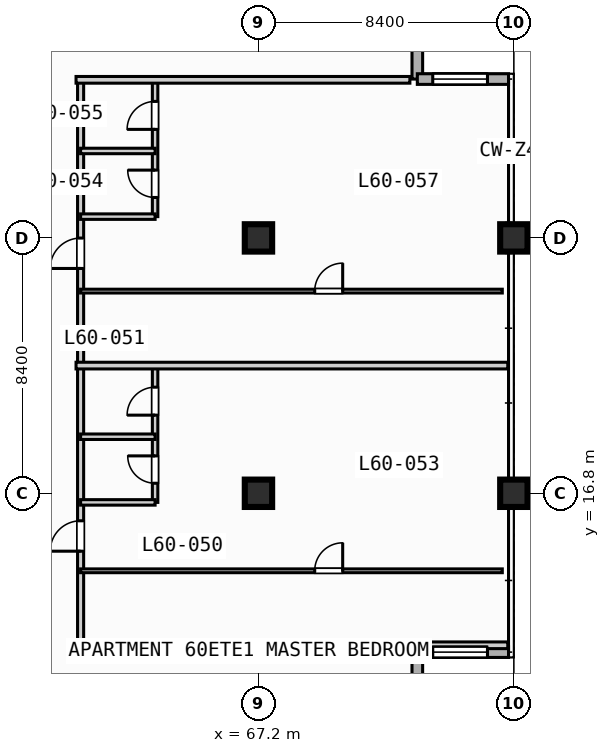
"""IFC4 building model, lengths in metres.
Left out: names, types, materials, properties, quantities, classifications, styles, units other than length and angle.
Written with IfcOpenShell. Run it as: python <this file> out.ifc"""

import sys

from ifc_helpers import new_model, si_unit, direction, frame, frame_2d, origin, origin_2d, place, context, subcontext, project, spatial, rectangle, extrude, element, fill, save


model = new_model("IFC4")
c1 = context("Model", 3, precision=1e-05, world=origin(), true_north=direction((0.0, 1.0)))
c2 = subcontext(c1, "Body", "Model", "MODEL_VIEW")
j1 = project(units=[si_unit("LENGTHUNIT", "METRE"), si_unit("PLANEANGLEUNIT", "RADIAN")], contexts=[c1])
p1 = place(None, origin())
s1 = spatial("IfcSite", under=j1, at=p1, CompositionType="ELEMENT")
p2 = place(p1, origin())
s2 = spatial("IfcBuilding", under=s1, at=p2, CompositionType="ELEMENT")
p3 = place(p2, frame((0.0, 0.0, 245.3)))
s3 = spatial("IfcBuildingStorey", under=s2, at=p3, CompositionType="ELEMENT", Elevation=245.3)
for number, where, z_axis, x_axis in (
    (1, (67.2, 16.8, 0.0), (0.0, 0.0, 1.0), (1.0, 0.0, 0.0)),
    (2, (67.2, 25.2, 0.0), (0.0, 0.0, 1.0), (1.0, 0.0, 0.0)),
    (3, (75.6, 16.8, 0.0), (0.0, 0.0, 1.0), (1.0, 0.0, 0.0)),
    (4, (75.6, 25.2, 0.0), (0.0, 0.0, 1.0), (1.0, 0.0, 0.0)),
):
    element("IfcColumn", number, at=place(p3, frame(where, z_axis=z_axis, x_axis=x_axis)), inside=s3, PredefinedType="COLUMN", context=c2, shape_type="SweptSolid", body=[
        extrude(rectangle(XDim=0.9, YDim=0.9, at=origin_2d()), origin(), (0.0, 0.0, 1.0), 3.7),
    ])
p4 = place(p3, frame((72.425, 33.425, 0.0), z_axis=(0.0, 0.0, 1.0), x_axis=(0.0, -1.0, 0.0)))
e5 = element("IfcWall", 5, at=p4, inside=s3, PredefinedType="STANDARD", context=c2, shape_type="SweptSolid", body=[
    extrude(rectangle(XDim=3.0, YDim=0.35, at=frame_2d((1.5, 0.0))), origin(), (0.0, 0.0, 1.0), 3.47),
])
p5 = place(p3, frame((72.425, 30.425, 0.0), z_axis=(0.0, 0.0, 1.0), x_axis=(1.0, 0.0, 0.0)))
e6 = element("IfcWall", 6, at=p5, inside=s3, PredefinedType="STANDARD", context=c2, shape_type="SweptSolid", body=[
    extrude(rectangle(XDim=3.0, YDim=0.35, at=frame_2d((1.5, 0.0))), origin(), (0.0, 0.0, 1.0), 3.47),
])
p6 = place(p5, frame((0.508, 0.0, 0.85)))
e7 = element("IfcOpeningElement", 7, at=p6, cuts=e6, PredefinedType="OPENING", context=c2, shape_type="SweptSolid", body=[
    extrude(rectangle(XDim=1.8, YDim=1.8, at=frame_2d((0.9, 0.9))), frame((0.0, 0.185, 0.0), z_axis=(0.0, -1.0, 0.0), x_axis=(1.0, 0.0, 0.0)), (0.0, 0.0, 1.0), 0.37),
])
p7 = place(p3, frame((75.425, 11.575, 0.0), z_axis=(0.0, 0.0, 1.0), x_axis=(-1.0, 0.0, 0.0)))
e8 = element("IfcWall", 8, at=p7, inside=s3, PredefinedType="STANDARD", context=c2, shape_type="SweptSolid", body=[
    extrude(rectangle(XDim=3.0, YDim=0.35, at=frame_2d((1.5, 0.0))), origin(), (0.0, 0.0, 1.0), 3.47),
])
p8 = place(p7, frame((0.692, 0.0, 0.85)))
e9 = element("IfcOpeningElement", 9, at=p8, cuts=e8, PredefinedType="OPENING", context=c2, shape_type="SweptSolid", body=[
    extrude(rectangle(XDim=1.8, YDim=1.8, at=frame_2d((0.9, 0.9))), frame((0.0, 0.185, 0.0), z_axis=(0.0, -1.0, 0.0), x_axis=(1.0, 0.0, 0.0)), (0.0, 0.0, 1.0), 0.37),
])
p9 = place(p3, frame((72.425, 11.575, 0.0), z_axis=(0.0, 0.0, 1.0), x_axis=(0.0, -1.0, 0.0)))
e10 = element("IfcWall", 10, at=p9, inside=s3, PredefinedType="STANDARD", context=c2, shape_type="SweptSolid", body=[
    extrude(rectangle(XDim=3.0, YDim=0.35, at=frame_2d((1.5, 0.0))), origin(), (0.0, 0.0, 1.0), 3.47),
])
p10 = place(p3, frame((61.35, 11.8, 0.0), z_axis=(0.0, 0.0, 1.0), x_axis=(0.0, 1.0, 0.0)))
e11 = element("IfcWall", 11, at=p10, inside=s3, PredefinedType="PARTITIONING", context=c2, shape_type="SweptSolid", body=[
    extrude(rectangle(XDim=18.6, YDim=0.2, at=frame_2d((9.3, 0.0))), origin(), (0.0, 0.0, 1.0), 3.47),
])
p11 = place(p10, frame((3.095, 0.0, 0.0)))
e12 = element("IfcOpeningElement", 12, at=p11, cuts=e11, PredefinedType="OPENING", context=c2, shape_type="SweptSolid", body=[
    extrude(rectangle(XDim=1.0, YDim=2.15, at=frame_2d((0.5, 1.075))), frame((0.0, 0.11, 0.0), z_axis=(0.0, -1.0, 0.0), x_axis=(1.0, 0.0, 0.0)), (0.0, 0.0, 1.0), 0.22),
])
p12 = place(p10, frame((12.395, 0.0, 0.0)))
e13 = element("IfcOpeningElement", 13, at=p12, cuts=e11, PredefinedType="OPENING", context=c2, shape_type="SweptSolid", body=[
    extrude(rectangle(XDim=1.0, YDim=2.15, at=frame_2d((0.5, 1.075))), frame((0.0, 0.11, 0.0), z_axis=(0.0, -1.0, 0.0), x_axis=(1.0, 0.0, 0.0)), (0.0, 0.0, 1.0), 0.22),
])
p13 = place(p3, frame((61.2, 11.8, 0.0), z_axis=(0.0, 0.0, 1.0), x_axis=(1.0, 0.0, 0.0)))
e14 = element("IfcWall", 14, at=p13, inside=s3, PredefinedType="PARTITIONING", context=c2, shape_type="SweptSolid", body=[
    extrude(rectangle(XDim=14.2, YDim=0.22, at=frame_2d((7.1, 0.0))), origin(), (0.0, 0.0, 1.0), 3.47),
])
p14 = place(p3, frame((63.8, 16.5, 0.0), z_axis=(0.0, 0.0, 1.0), x_axis=(0.0, 1.0, 0.0)))
e15 = element("IfcWall", 15, at=p14, inside=s3, PredefinedType="PLUMBINGWALL", context=c2, shape_type="SweptSolid", body=[
    extrude(rectangle(XDim=4.5, YDim=0.18, at=frame_2d((2.25, 0.0))), origin(), (0.0, 0.0, 1.0), 3.47),
])
p15 = place(p14, frame((0.63, 0.0, 0.0)))
e16 = element("IfcOpeningElement", 16, at=p15, cuts=e15, PredefinedType="OPENING", context=c2, shape_type="SweptSolid", body=[
    extrude(rectangle(XDim=0.9, YDim=2.1, at=frame_2d((0.45, 1.05))), frame((0.0, 0.1, 0.0), z_axis=(0.0, -1.0, 0.0), x_axis=(1.0, 0.0, 0.0)), (0.0, 0.0, 1.0), 0.2),
])
p16 = place(p14, frame((2.87, 0.0, 0.0)))
e17 = element("IfcOpeningElement", 17, at=p16, cuts=e15, PredefinedType="OPENING", context=c2, shape_type="SweptSolid", body=[
    extrude(rectangle(XDim=0.92, YDim=2.1, at=frame_2d((0.46, 1.05))), frame((0.0, 0.1, 0.0), z_axis=(0.0, -1.0, 0.0), x_axis=(1.0, 0.0, 0.0)), (0.0, 0.0, 1.0), 0.2),
])
for number, where, z_axis, x_axis in (
    (18, (61.35, 16.5, 0.0), (0.0, 0.0, 1.0), (1.0, 0.0, 0.0)),
    (19, (61.35, 18.66, 0.0), (0.0, 0.0, 1.0), (1.0, 0.0, 0.0)),
):
    element("IfcWall", number, at=place(p3, frame(where, z_axis=z_axis, x_axis=x_axis)), inside=s3, PredefinedType="PLUMBINGWALL", context=c2, shape_type="SweptSolid", body=[
        extrude(rectangle(XDim=2.45, YDim=0.18, at=frame_2d((1.225, 0.0))), origin(), (0.0, 0.0, 1.0), 3.47),
    ])
p17 = place(p3, frame((61.35, 14.25, 0.0), z_axis=(0.0, 0.0, 1.0), x_axis=(1.0, 0.0, 0.0)))
e20 = element("IfcWall", 20, at=p17, inside=s3, PredefinedType="PARTITIONING", context=c2, shape_type="SweptSolid", body=[
    extrude(rectangle(XDim=13.87, YDim=0.125, at=frame_2d((6.935, 0.0))), origin(), (0.0, 0.0, 1.0), 3.47),
])
p18 = place(p17, frame((7.7, 0.0, 0.0)))
e21 = element("IfcOpeningElement", 21, at=p18, cuts=e20, PredefinedType="OPENING", context=c2, shape_type="SweptSolid", body=[
    extrude(rectangle(XDim=0.92, YDim=2.1, at=frame_2d((0.46, 1.05))), frame((0.0, 0.073, 0.0), z_axis=(0.0, -1.0, 0.0), x_axis=(1.0, 0.0, 0.0)), (0.0, 0.0, 1.0), 0.145),
])
p19 = place(p3, frame((61.2, 21.0, 0.0), z_axis=(0.0, 0.0, 1.0), x_axis=(1.0, 0.0, 0.0)))
e22 = element("IfcWall", 22, at=p19, inside=s3, PredefinedType="PARTITIONING", context=c2, shape_type="SweptSolid", body=[
    extrude(rectangle(XDim=14.2, YDim=0.22, at=frame_2d((7.1, 0.0))), origin(), (0.0, 0.0, 1.0), 3.47),
])
p20 = place(p3, frame((63.8, 25.9, 0.0), z_axis=(0.0, 0.0, 1.0), x_axis=(0.0, 1.0, 0.0)))
e23 = element("IfcWall", 23, at=p20, inside=s3, PredefinedType="PLUMBINGWALL", context=c2, shape_type="SweptSolid", body=[
    extrude(rectangle(XDim=4.5, YDim=0.18, at=frame_2d((2.25, 0.0))), origin(), (0.0, 0.0, 1.0), 3.47),
])
p21 = place(p20, frame((0.63, 0.0, 0.0)))
e24 = element("IfcOpeningElement", 24, at=p21, cuts=e23, PredefinedType="OPENING", context=c2, shape_type="SweptSolid", body=[
    extrude(rectangle(XDim=0.9, YDim=2.1, at=frame_2d((0.45, 1.05))), frame((0.0, 0.1, 0.0), z_axis=(0.0, -1.0, 0.0), x_axis=(1.0, 0.0, 0.0)), (0.0, 0.0, 1.0), 0.2),
])
p22 = place(p20, frame((2.87, 0.0, 0.0)))
e25 = element("IfcOpeningElement", 25, at=p22, cuts=e23, PredefinedType="OPENING", context=c2, shape_type="SweptSolid", body=[
    extrude(rectangle(XDim=0.92, YDim=2.1, at=frame_2d((0.46, 1.05))), frame((0.0, 0.1, 0.0), z_axis=(0.0, -1.0, 0.0), x_axis=(1.0, 0.0, 0.0)), (0.0, 0.0, 1.0), 0.2),
])
for number, where, z_axis, x_axis in (
    (26, (61.35, 25.9, 0.0), (0.0, 0.0, 1.0), (1.0, 0.0, 0.0)),
    (27, (61.35, 28.06, 0.0), (0.0, 0.0, 1.0), (1.0, 0.0, 0.0)),
):
    element("IfcWall", number, at=place(p3, frame(where, z_axis=z_axis, x_axis=x_axis)), inside=s3, PredefinedType="PLUMBINGWALL", context=c2, shape_type="SweptSolid", body=[
        extrude(rectangle(XDim=2.45, YDim=0.18, at=frame_2d((1.225, 0.0))), origin(), (0.0, 0.0, 1.0), 3.47),
    ])
p23 = place(p3, frame((61.35, 23.45, 0.0), z_axis=(0.0, 0.0, 1.0), x_axis=(1.0, 0.0, 0.0)))
e28 = element("IfcWall", 28, at=p23, inside=s3, PredefinedType="PARTITIONING", context=c2, shape_type="SweptSolid", body=[
    extrude(rectangle(XDim=13.87, YDim=0.125, at=frame_2d((6.935, 0.0))), origin(), (0.0, 0.0, 1.0), 3.47),
])
p24 = place(p23, frame((7.7, 0.0, 0.0)))
e29 = element("IfcOpeningElement", 29, at=p24, cuts=e28, PredefinedType="OPENING", context=c2, shape_type="SweptSolid", body=[
    extrude(rectangle(XDim=0.92, YDim=2.1, at=frame_2d((0.46, 1.05))), frame((0.0, 0.073, 0.0), z_axis=(0.0, -1.0, 0.0), x_axis=(1.0, 0.0, 0.0)), (0.0, 0.0, 1.0), 0.145),
])
p25 = place(p3, frame((61.2, 30.4, 0.0), z_axis=(0.0, 0.0, 1.0), x_axis=(1.0, 0.0, 0.0)))
e30 = element("IfcWall", 30, at=p25, inside=s3, PredefinedType="PARTITIONING", context=c2, shape_type="SweptSolid", body=[
    extrude(rectangle(XDim=10.98, YDim=0.22, at=frame_2d((5.49, 0.0))), origin(), (0.0, 0.0, 1.0), 3.47),
])
p26 = place(p6, origin())
e31 = element("IfcWindow", 31, at=p26, inside=s3, PartitioningType="SINGLE_PANEL", PredefinedType="WINDOW", context=c2, shape_type="SweptSolid", body=[
    extrude(rectangle(XDim=1.8, YDim=1.8, at=frame_2d((0.9, 0.9))), frame((0.0, 0.03, 0.0), z_axis=(0.0, -1.0, 0.0), x_axis=(1.0, 0.0, 0.0)), (0.0, 0.0, 1.0), 0.06),
])
fill(e7, e31)
p27 = place(p8, origin())
e32 = element("IfcWindow", 32, at=p27, inside=s3, PartitioningType="SINGLE_PANEL", PredefinedType="WINDOW", context=c2, shape_type="SweptSolid", body=[
    extrude(rectangle(XDim=1.8, YDim=1.8, at=frame_2d((0.9, 0.9))), frame((0.0, 0.03, 0.0), z_axis=(0.0, -1.0, 0.0), x_axis=(1.0, 0.0, 0.0)), (0.0, 0.0, 1.0), 0.06),
])
fill(e9, e32)
p28 = place(p11, origin())
e33 = element("IfcDoor", 33, at=p28, inside=s3, OperationType="SINGLE_SWING_LEFT", PredefinedType="DOOR", context=c2, shape_type="SweptSolid", body=[
    extrude(rectangle(XDim=1.0, YDim=2.15, at=frame_2d((0.5, 1.075))), frame((0.0, 0.025, 0.0), z_axis=(0.0, -1.0, 0.0), x_axis=(1.0, 0.0, 0.0)), (0.0, 0.0, 1.0), 0.05),
])
fill(e12, e33)
p29 = place(p12, origin())
e34 = element("IfcDoor", 34, at=p29, inside=s3, OperationType="SINGLE_SWING_LEFT", PredefinedType="DOOR", context=c2, shape_type="SweptSolid", body=[
    extrude(rectangle(XDim=1.0, YDim=2.15, at=frame_2d((0.5, 1.075))), frame((0.0, 0.025, 0.0), z_axis=(0.0, -1.0, 0.0), x_axis=(1.0, 0.0, 0.0)), (0.0, 0.0, 1.0), 0.05),
])
fill(e13, e34)
p30 = place(p15, origin())
e35 = element("IfcDoor", 35, at=p30, inside=s3, OperationType="SINGLE_SWING_RIGHT", PredefinedType="DOOR", context=c2, shape_type="SweptSolid", body=[
    extrude(rectangle(XDim=0.9, YDim=2.1, at=frame_2d((0.45, 1.05))), frame((0.0, 0.025, 0.0), z_axis=(0.0, -1.0, 0.0), x_axis=(1.0, 0.0, 0.0)), (0.0, 0.0, 1.0), 0.05),
])
fill(e16, e35)
p31 = place(p16, origin())
e36 = element("IfcDoor", 36, at=p31, inside=s3, OperationType="SINGLE_SWING_LEFT", PredefinedType="DOOR", context=c2, shape_type="SweptSolid", body=[
    extrude(rectangle(XDim=0.92, YDim=2.1, at=frame_2d((0.46, 1.05))), frame((0.0, 0.025, 0.0), z_axis=(0.0, -1.0, 0.0), x_axis=(1.0, 0.0, 0.0)), (0.0, 0.0, 1.0), 0.05),
])
fill(e17, e36)
p32 = place(p18, origin())
e37 = element("IfcDoor", 37, at=p32, inside=s3, OperationType="SINGLE_SWING_RIGHT", PredefinedType="DOOR", context=c2, shape_type="SweptSolid", body=[
    extrude(rectangle(XDim=0.92, YDim=2.1, at=frame_2d((0.46, 1.05))), frame((0.0, 0.025, 0.0), z_axis=(0.0, -1.0, 0.0), x_axis=(1.0, 0.0, 0.0)), (0.0, 0.0, 1.0), 0.05),
])
fill(e21, e37)
p33 = place(p21, origin())
e38 = element("IfcDoor", 38, at=p33, inside=s3, OperationType="SINGLE_SWING_RIGHT", PredefinedType="DOOR", context=c2, shape_type="SweptSolid", body=[
    extrude(rectangle(XDim=0.9, YDim=2.1, at=frame_2d((0.45, 1.05))), frame((0.0, 0.025, 0.0), z_axis=(0.0, -1.0, 0.0), x_axis=(1.0, 0.0, 0.0)), (0.0, 0.0, 1.0), 0.05),
])
fill(e24, e38)
p34 = place(p22, origin())
e39 = element("IfcDoor", 39, at=p34, inside=s3, OperationType="SINGLE_SWING_LEFT", PredefinedType="DOOR", context=c2, shape_type="SweptSolid", body=[
    extrude(rectangle(XDim=0.92, YDim=2.1, at=frame_2d((0.46, 1.05))), frame((0.0, 0.025, 0.0), z_axis=(0.0, -1.0, 0.0), x_axis=(1.0, 0.0, 0.0)), (0.0, 0.0, 1.0), 0.05),
])
fill(e25, e39)
p35 = place(p24, origin())
e40 = element("IfcDoor", 40, at=p35, inside=s3, OperationType="SINGLE_SWING_RIGHT", PredefinedType="DOOR", context=c2, shape_type="SweptSolid", body=[
    extrude(rectangle(XDim=0.92, YDim=2.1, at=frame_2d((0.46, 1.05))), frame((0.0, 0.025, 0.0), z_axis=(0.0, -1.0, 0.0), x_axis=(1.0, 0.0, 0.0)), (0.0, 0.0, 1.0), 0.05),
])
fill(e29, e40)
save(model, sys.argv[1])
